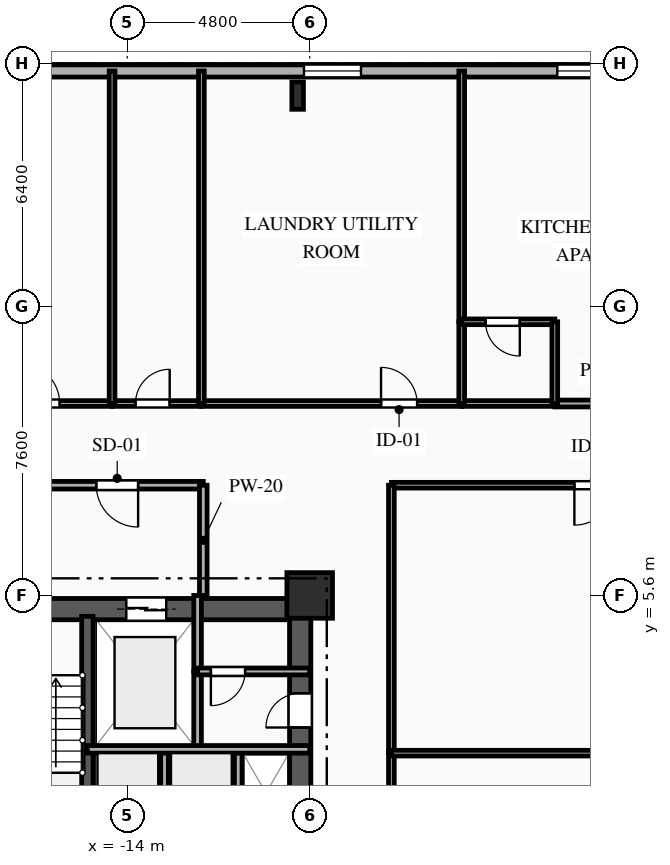
"""IFC4 building model, lengths in metres.
Left out: names, types, materials, properties, quantities, classifications, styles, units other than length and angle.
Written with IfcOpenShell. Run it as: python <this file> out.ifc"""

import sys

from ifc_helpers import new_model, si_unit, direction, frame, frame_2d, origin, origin_2d, place, context, subcontext, project, spatial, rectangle, i_section, extrude, element, fill, save


model = new_model("IFC4")
c1 = context("Model", 3, precision=1e-05, world=origin(), true_north=direction((0.0, 1.0)))
c2 = subcontext(c1, "Body", "Model", "MODEL_VIEW")
j1 = project(units=[si_unit("LENGTHUNIT", "METRE"), si_unit("PLANEANGLEUNIT", "RADIAN")], contexts=[c1])
p1 = place(None, origin())
s1 = spatial("IfcSite", under=j1, at=p1, CompositionType="ELEMENT")
p2 = place(p1, origin())
s2 = spatial("IfcBuilding", under=s1, at=p2, CompositionType="ELEMENT")
p3 = place(p2, frame((0.0, 0.0, 40.4)))
s3 = spatial("IfcBuildingStorey", under=s2, at=p3, CompositionType="ELEMENT", Elevation=40.4)
p4 = place(p3, frame((-9.2, 5.6, 0.0), z_axis=(0.0, 0.0, 1.0), x_axis=(1.0, 0.0, 0.0)))
e1 = element("IfcColumn", 1, at=p4, inside=s3, PredefinedType="COLUMN", context=c2, shape_type="SweptSolid", body=[
    extrude(rectangle(XDim=1.2, YDim=1.2, at=origin_2d()), origin(), (0.0, 0.0, 1.0), 3.35),
])
p5 = place(p3, frame((-9.517, 18.75, 0.0), z_axis=(0.0, 0.0, 1.0), x_axis=(1.0, 0.0, 0.0)))
e2 = element("IfcColumn", 2, at=p5, inside=s3, PredefinedType="COLUMN", context=c2, shape_type="SweptSolid", body=[
    extrude(i_section(OverallWidth=0.304, OverallDepth=0.716, WebThickness=0.021, FlangeThickness=0.04, FilletRadius=0.027, at=origin_2d()), origin(), (0.0, 0.0, 1.0), 3.35),
])
p6 = place(p3, frame((-29.2, 19.4, 0.0), z_axis=(0.0, 0.0, 1.0), x_axis=(1.0, 0.0, 0.0)))
e3 = element("IfcWall", 3, at=p6, inside=s3, PredefinedType="SOLIDWALL", context=c2, shape_type="SweptSolid", body=[
    extrude(rectangle(XDim=58.4, YDim=0.32, at=frame_2d((29.2, 0.0))), origin(), (0.0, 0.0, 1.0), 3.035),
])
p7 = place(p6, frame((10.596, 0.0, 0.85)))
e4 = element("IfcOpeningElement", 4, at=p7, cuts=e3, PredefinedType="OPENING", context=c2, shape_type="SweptSolid", body=[
    extrude(rectangle(XDim=1.65, YDim=1.85, at=frame_2d((0.825, 0.925))), frame((0.0, 0.17, 0.0), z_axis=(0.0, -1.0, 0.0), x_axis=(1.0, 0.0, 0.0)), (0.0, 0.0, 1.0), 0.34),
])
p8 = place(p6, frame((19.85, 0.0, 0.85)))
e5 = element("IfcOpeningElement", 5, at=p8, cuts=e3, PredefinedType="OPENING", context=c2, shape_type="SweptSolid", body=[
    extrude(rectangle(XDim=1.5, YDim=1.85, at=frame_2d((0.75, 0.925))), frame((0.0, 0.17, 0.0), z_axis=(0.0, -1.0, 0.0), x_axis=(1.0, 0.0, 0.0)), (0.0, 0.0, 1.0), 0.34),
])
p9 = place(p6, frame((26.516, 0.0, 0.85)))
e6 = element("IfcOpeningElement", 6, at=p9, cuts=e3, PredefinedType="OPENING", context=c2, shape_type="SweptSolid", body=[
    extrude(rectangle(XDim=2.2, YDim=1.85, at=frame_2d((1.1, 0.925))), frame((0.0, 0.17, 0.0), z_axis=(0.0, -1.0, 0.0), x_axis=(1.0, 0.0, 0.0)), (0.0, 0.0, 1.0), 0.34),
])
p10 = place(p6, frame((35.716, 0.0, 0.85)))
e7 = element("IfcOpeningElement", 7, at=p10, cuts=e3, PredefinedType="OPENING", context=c2, shape_type="SweptSolid", body=[
    extrude(rectangle(XDim=2.2, YDim=1.85, at=frame_2d((1.1, 0.925))), frame((0.0, 0.17, 0.0), z_axis=(0.0, -1.0, 0.0), x_axis=(1.0, 0.0, 0.0)), (0.0, 0.0, 1.0), 0.34),
])
p11 = place(p6, frame((44.095, 0.0, 0.85)))
e8 = element("IfcOpeningElement", 8, at=p11, cuts=e3, PredefinedType="OPENING", context=c2, shape_type="SweptSolid", body=[
    extrude(rectangle(XDim=1.65, YDim=1.85, at=frame_2d((0.825, 0.925))), frame((0.0, 0.17, 0.0), z_axis=(0.0, -1.0, 0.0), x_axis=(1.0, 0.0, 0.0)), (0.0, 0.0, 1.0), 0.34),
])
p12 = place(p6, frame((48.975, 0.0, 0.85)))
e9 = element("IfcOpeningElement", 9, at=p12, cuts=e3, PredefinedType="OPENING", context=c2, shape_type="SweptSolid", body=[
    extrude(rectangle(XDim=1.65, YDim=1.85, at=frame_2d((0.825, 0.925))), frame((0.0, 0.17, 0.0), z_axis=(0.0, -1.0, 0.0), x_axis=(1.0, 0.0, 0.0)), (0.0, 0.0, 1.0), 0.34),
])
p13 = place(p6, frame((52.82, 0.0, 0.85)))
e10 = element("IfcOpeningElement", 10, at=p13, cuts=e3, PredefinedType="OPENING", context=c2, shape_type="SweptSolid", body=[
    extrude(rectangle(XDim=1.4, YDim=1.85, at=frame_2d((0.7, 0.925))), frame((0.0, 0.17, 0.0), z_axis=(0.0, -1.0, 0.0), x_axis=(1.0, 0.0, 0.0)), (0.0, 0.0, 1.0), 0.34),
])
p14 = place(p6, frame((55.575, 0.0, 0.85)))
e11 = element("IfcOpeningElement", 11, at=p14, cuts=e3, PredefinedType="OPENING", context=c2, shape_type="SweptSolid", body=[
    extrude(rectangle(XDim=1.65, YDim=1.85, at=frame_2d((0.825, 0.925))), frame((0.0, 0.17, 0.0), z_axis=(0.0, -1.0, 0.0), x_axis=(1.0, 0.0, 0.0)), (0.0, 0.0, 1.0), 0.34),
])
p15 = place(p3, frame((-18.8, 5.24, 0.0), z_axis=(0.0, 0.0, 1.0), x_axis=(1.0, 0.0, 0.0)))
e12 = element("IfcWall", 12, at=p15, inside=s3, PredefinedType="SHEAR", context=c2, shape_type="SweptSolid", body=[
    extrude(rectangle(XDim=9.6, YDim=0.56, at=frame_2d((4.8, 0.0))), origin(), (0.0, 0.0, 1.0), 3.035),
])
p16 = place(p15, frame((1.55, 0.0, 0.0)))
e13 = element("IfcOpeningElement", 13, at=p16, cuts=e12, PredefinedType="OPENING", context=c2, shape_type="SweptSolid", body=[
    extrude(rectangle(XDim=1.1, YDim=2.15, at=frame_2d((0.55, 1.075))), frame((0.0, 0.29, 0.0), z_axis=(0.0, -1.0, 0.0), x_axis=(1.0, 0.0, 0.0)), (0.0, 0.0, 1.0), 0.58),
])
p17 = place(p15, frame((4.775, 0.0, 0.0)))
e14 = element("IfcOpeningElement", 14, at=p17, cuts=e12, PredefinedType="OPENING", context=c2, shape_type="SweptSolid", body=[
    extrude(rectangle(XDim=1.05, YDim=2.1, at=frame_2d((0.525, 1.05))), frame((0.0, 0.29, 0.0), z_axis=(0.0, -1.0, 0.0), x_axis=(1.0, 0.0, 0.0)), (0.0, 0.0, 1.0), 0.58),
])
p18 = place(p3, frame((-9.45, -5.05, 0.0), z_axis=(0.0, 0.0, 1.0), x_axis=(0.0, 1.0, 0.0)))
e15 = element("IfcWall", 15, at=p18, inside=s3, PredefinedType="SHEAR", context=c2, shape_type="SweptSolid", body=[
    extrude(rectangle(XDim=10.1, YDim=0.56, at=frame_2d((5.05, 0.0))), origin(), (0.0, 0.0, 1.0), 3.035),
])
p19 = place(p18, frame((7.175, 0.0, 0.0)))
e16 = element("IfcOpeningElement", 16, at=p19, cuts=e15, PredefinedType="OPENING", context=c2, shape_type="SweptSolid", body=[
    extrude(rectangle(XDim=0.9, YDim=2.1, at=frame_2d((0.45, 1.05))), frame((0.0, 0.29, 0.0), z_axis=(0.0, -1.0, 0.0), x_axis=(1.0, 0.0, 0.0)), (0.0, 0.0, 1.0), 0.58),
])
p20 = place(p18, frame((2.4, 0.0, 0.0)))
e17 = element("IfcOpeningElement", 17, at=p20, cuts=e15, PredefinedType="OPENING", context=c2, shape_type="SweptSolid", body=[
    extrude(rectangle(XDim=1.2, YDim=2.15, at=frame_2d((0.6, 1.075))), frame((0.0, 0.29, 0.0), z_axis=(0.0, -1.0, 0.0), x_axis=(1.0, 0.0, 0.0)), (0.0, 0.0, 1.0), 0.58),
])
p21 = place(p3, frame((-15.05, -5.05, 0.0), z_axis=(0.0, 0.0, 1.0), x_axis=(0.0, 1.0, 0.0)))
e18 = element("IfcWall", 18, at=p21, inside=s3, PredefinedType="SHEAR", context=c2, shape_type="SweptSolid", body=[
    extrude(rectangle(XDim=10.1, YDim=0.3, at=frame_2d((5.05, 0.0))), origin(), (0.0, 0.0, 1.0), 3.035),
])
p22 = place(p3, frame((-12.15, 1.55, 0.0), z_axis=(0.0, 0.0, 1.0), x_axis=(0.0, 1.0, 0.0)))
e19 = element("IfcWall", 19, at=p22, inside=s3, PredefinedType="PARTITIONING", context=c2, shape_type="SweptSolid", body=[
    extrude(rectangle(XDim=2.05, YDim=0.2, at=frame_2d((1.025, 0.0))), origin(), (0.0, 0.0, 1.0), 3.035),
])
p23 = place(p3, frame((-12.15, 3.6, 0.0), z_axis=(0.0, 0.0, 1.0), x_axis=(0.0, 1.0, 0.0)))
e20 = element("IfcWall", 20, at=p23, inside=s3, PredefinedType="PARTITIONING", context=c2, shape_type="SweptSolid", body=[
    extrude(rectangle(XDim=2.0, YDim=0.2, at=frame_2d((1.0, 0.0))), origin(), (0.0, 0.0, 1.0), 3.035),
])
p24 = place(p3, frame((-12.0, 8.5, 0.0), z_axis=(0.0, 0.0, 1.0), x_axis=(-1.0, 0.0, 0.0)))
e21 = element("IfcWall", 21, at=p24, inside=s3, PredefinedType="PARTITIONING", context=c2, shape_type="SweptSolid", body=[
    extrude(rectangle(XDim=6.8, YDim=0.2, at=frame_2d((3.4, 0.0))), origin(), (0.0, 0.0, 1.0), 3.035),
])
p25 = place(p24, frame((1.715, 0.0, 0.0)))
e22 = element("IfcOpeningElement", 22, at=p25, cuts=e21, PredefinedType="OPENING", context=c2, shape_type="SweptSolid", body=[
    extrude(rectangle(XDim=1.1, YDim=2.15, at=frame_2d((0.55, 1.075))), frame((0.0, 0.11, 0.0), z_axis=(0.0, -1.0, 0.0), x_axis=(1.0, 0.0, 0.0)), (0.0, 0.0, 1.0), 0.22),
])
p26 = place(p3, frame((-12.0, 5.6, 0.0), z_axis=(0.0, 0.0, 1.0), x_axis=(0.0, 1.0, 0.0)))
e23 = element("IfcWall", 23, at=p26, inside=s3, PredefinedType="PARTITIONING", context=c2, shape_type="SweptSolid", body=[
    extrude(rectangle(XDim=2.9, YDim=0.2, at=frame_2d((1.45, 0.0))), origin(), (0.0, 0.0, 1.0), 3.035),
])
p27 = place(p3, frame((-9.2, 3.6, 0.0), z_axis=(0.0, 0.0, 1.0), x_axis=(-1.0, 0.0, 0.0)))
e24 = element("IfcWall", 24, at=p27, inside=s3, PredefinedType="PARTITIONING", context=c2, shape_type="SweptSolid", body=[
    extrude(rectangle(XDim=2.95, YDim=0.18, at=frame_2d((1.475, 0.0))), origin(), (0.0, 0.0, 1.0), 3.035),
])
p28 = place(p27, frame((1.7, 0.0, 0.0)))
e25 = element("IfcOpeningElement", 25, at=p28, cuts=e24, PredefinedType="OPENING", context=c2, shape_type="SweptSolid", body=[
    extrude(rectangle(XDim=0.9, YDim=2.1, at=frame_2d((0.45, 1.05))), frame((0.0, 0.1, 0.0), z_axis=(0.0, -1.0, 0.0), x_axis=(1.0, 0.0, 0.0)), (0.0, 0.0, 1.0), 0.2),
])
for number, where, z_axis, x_axis in (
    (26, (-13.02, -0.75, 0.0), (0.0, 0.0, 1.0), (0.0, 1.0, 0.0)),
    (27, (-11.08, -0.75, 0.0), (0.0, 0.0, 1.0), (0.0, 1.0, 0.0)),
):
    element("IfcWall", number, at=place(p3, frame(where, z_axis=z_axis, x_axis=x_axis)), inside=s3, PredefinedType="PARTITIONING", context=c2, shape_type="SweptSolid", body=[
        extrude(rectangle(XDim=2.3, YDim=0.2, at=frame_2d((1.15, 0.0))), origin(), (0.0, 0.0, 1.0), 3.035),
    ])
p29 = place(p3, frame((-23.0, 10.65, 0.0), z_axis=(0.0, 0.0, 1.0), x_axis=(1.0, 0.0, 0.0)))
e28 = element("IfcWall", 28, at=p29, inside=s3, PredefinedType="PARTITIONING", context=c2, shape_type="SweptSolid", body=[
    extrude(rectangle(XDim=8.6, YDim=0.15, at=frame_2d((4.3, 0.0))), origin(), (0.0, 0.0, 1.0), 3.035),
])
p30 = place(p29, frame((6.171, 0.0, 0.0)))
e29 = element("IfcOpeningElement", 29, at=p30, cuts=e28, PredefinedType="OPENING", context=c2, shape_type="SweptSolid", body=[
    extrude(rectangle(XDim=1.05, YDim=2.15, at=frame_2d((0.525, 1.075))), frame((0.0, 0.085, 0.0), z_axis=(0.0, -1.0, 0.0), x_axis=(1.0, 0.0, 0.0)), (0.0, 0.0, 1.0), 0.17),
])
p31 = place(p3, frame((-14.4, 10.65, 0.0), z_axis=(0.0, 0.0, 1.0), x_axis=(1.0, 0.0, 0.0)))
e30 = element("IfcWall", 30, at=p31, inside=s3, PredefinedType="PLUMBINGWALL", context=c2, shape_type="SweptSolid", body=[
    extrude(rectangle(XDim=2.35, YDim=0.15, at=frame_2d((1.175, 0.0))), origin(), (0.0, 0.0, 1.0), 3.035),
])
p32 = place(p31, frame((0.616, 0.0, 0.0)))
e31 = element("IfcOpeningElement", 31, at=p32, cuts=e30, PredefinedType="OPENING", context=c2, shape_type="SweptSolid", body=[
    extrude(rectangle(XDim=0.9, YDim=2.1, at=frame_2d((0.45, 1.05))), frame((0.0, 0.085, 0.0), z_axis=(0.0, -1.0, 0.0), x_axis=(1.0, 0.0, 0.0)), (0.0, 0.0, 1.0), 0.17),
])
p33 = place(p3, frame((-12.05, 10.65, 0.0), z_axis=(0.0, 0.0, 1.0), x_axis=(1.0, 0.0, 0.0)))
e32 = element("IfcWall", 32, at=p33, inside=s3, PredefinedType="PARTITIONING", context=c2, shape_type="SweptSolid", body=[
    extrude(rectangle(XDim=6.85, YDim=0.15, at=frame_2d((3.425, 0.0))), origin(), (0.0, 0.0, 1.0), 3.035),
])
p34 = place(p33, frame((4.728, 0.0, 0.0)))
e33 = element("IfcOpeningElement", 33, at=p34, cuts=e32, PredefinedType="OPENING", context=c2, shape_type="SweptSolid", body=[
    extrude(rectangle(XDim=0.95, YDim=2.1, at=frame_2d((0.475, 1.05))), frame((0.0, 0.085, 0.0), z_axis=(0.0, -1.0, 0.0), x_axis=(1.0, 0.0, 0.0)), (0.0, 0.0, 1.0), 0.17),
])
p35 = place(p3, frame((-2.75, 10.65, 0.0), z_axis=(0.0, 0.0, 1.0), x_axis=(1.0, 0.0, 0.0)))
e34 = element("IfcWall", 34, at=p35, inside=s3, PredefinedType="PARTITIONING", context=c2, shape_type="SweptSolid", body=[
    extrude(rectangle(XDim=2.75, YDim=0.18, at=frame_2d((1.375, 0.0))), origin(), (0.0, 0.0, 1.0), 3.035),
])
p36 = place(p3, frame((-5.2, 10.65, 0.0), z_axis=(0.0, 0.0, 1.0), x_axis=(1.0, 0.0, 0.0)))
e35 = element("IfcWall", 35, at=p36, inside=s3, PredefinedType="PLUMBINGWALL", context=c2, shape_type="SweptSolid", body=[
    extrude(rectangle(XDim=2.45, YDim=0.15, at=frame_2d((1.225, 0.0))), origin(), (0.0, 0.0, 1.0), 3.035),
])
p37 = place(p3, frame((0.0, 8.5, 0.0), z_axis=(0.0, 0.0, 1.0), x_axis=(-1.0, 0.0, 0.0)))
e36 = element("IfcWall", 36, at=p37, inside=s3, PredefinedType="PARTITIONING", context=c2, shape_type="SweptSolid", body=[
    extrude(rectangle(XDim=7.05, YDim=0.15, at=frame_2d((3.525, 0.0))), origin(), (0.0, 0.0, 1.0), 3.035),
])
p38 = place(p37, frame((1.185, 0.0, 0.0)))
e37 = element("IfcOpeningElement", 37, at=p38, cuts=e36, PredefinedType="OPENING", context=c2, shape_type="SweptSolid", body=[
    extrude(rectangle(XDim=1.05, YDim=2.15, at=frame_2d((0.525, 1.075))), frame((0.0, 0.085, 0.0), z_axis=(0.0, -1.0, 0.0), x_axis=(1.0, 0.0, 0.0)), (0.0, 0.0, 1.0), 0.17),
])
for number, where, z_axis, x_axis in (
    (38, (-7.05, 1.45, 0.0), (0.0, 0.0, 1.0), (0.0, -1.0, 0.0)),
    (39, (-7.05, 8.5, 0.0), (0.0, 0.0, 1.0), (0.0, -1.0, 0.0)),
):
    element("IfcWall", number, at=place(p3, frame(where, z_axis=z_axis, x_axis=x_axis)), inside=s3, PredefinedType="PARTITIONING", context=c2, shape_type="SweptSolid", body=[
        extrude(rectangle(XDim=7.05, YDim=0.15, at=frame_2d((3.525, 0.0))), origin(), (0.0, 0.0, 1.0), 3.035),
    ])
for number, where, z_axis, x_axis in (
    (40, (-14.4, 19.4, 0.0), (0.0, 0.0, 1.0), (0.0, -1.0, 0.0)),
    (41, (-12.05, 19.4, 0.0), (0.0, 0.0, 1.0), (0.0, -1.0, 0.0)),
):
    element("IfcWall", number, at=place(p3, frame(where, z_axis=z_axis, x_axis=x_axis)), inside=s3, PredefinedType="PLUMBINGWALL", context=c2, shape_type="SweptSolid", body=[
        extrude(rectangle(XDim=8.75, YDim=0.15, at=frame_2d((4.375, 0.0))), origin(), (0.0, 0.0, 1.0), 3.035),
    ])
p39 = place(p3, frame((-5.2, 19.4, 0.0), z_axis=(0.0, 0.0, 1.0), x_axis=(0.0, -1.0, 0.0)))
e42 = element("IfcWall", 42, at=p39, inside=s3, PredefinedType="PARTITIONING", context=c2, shape_type="SweptSolid", body=[
    extrude(rectangle(XDim=6.6, YDim=0.15, at=frame_2d((3.3, 0.0))), origin(), (0.0, 0.0, 1.0), 3.035),
])
p40 = place(p3, frame((-5.2, 12.8, 0.0), z_axis=(0.0, 0.0, 1.0), x_axis=(0.0, -1.0, 0.0)))
e43 = element("IfcWall", 43, at=p40, inside=s3, PredefinedType="PLUMBINGWALL", context=c2, shape_type="SweptSolid", body=[
    extrude(rectangle(XDim=2.15, YDim=0.15, at=frame_2d((1.075, 0.0))), origin(), (0.0, 0.0, 1.0), 3.035),
])
p41 = place(p3, frame((-2.75, 12.8, 0.0), z_axis=(0.0, 0.0, 1.0), x_axis=(-1.0, 0.0, 0.0)))
e44 = element("IfcWall", 44, at=p41, inside=s3, PredefinedType="PLUMBINGWALL", context=c2, shape_type="SweptSolid", body=[
    extrude(rectangle(XDim=2.45, YDim=0.15, at=frame_2d((1.225, 0.0))), origin(), (0.0, 0.0, 1.0), 3.035),
])
p42 = place(p41, frame((0.921, 0.0, 0.0)))
e45 = element("IfcOpeningElement", 45, at=p42, cuts=e44, PredefinedType="OPENING", context=c2, shape_type="SweptSolid", body=[
    extrude(rectangle(XDim=0.9, YDim=2.1, at=frame_2d((0.45, 1.05))), frame((0.0, 0.085, 0.0), z_axis=(0.0, -1.0, 0.0), x_axis=(1.0, 0.0, 0.0)), (0.0, 0.0, 1.0), 0.17),
])
p43 = place(p3, frame((-2.75, 10.65, 0.0), z_axis=(0.0, 0.0, 1.0), x_axis=(0.0, 1.0, 0.0)))
e46 = element("IfcWall", 46, at=p43, inside=s3, PredefinedType="PLUMBINGWALL", context=c2, shape_type="SweptSolid", body=[
    extrude(rectangle(XDim=2.15, YDim=0.15, at=frame_2d((1.075, 0.0))), origin(), (0.0, 0.0, 1.0), 3.035),
])
p44 = place(p3, frame((-7.05, 1.45, 0.0), z_axis=(0.0, 0.0, 1.0), x_axis=(1.0, 0.0, 0.0)))
e47 = element("IfcWall", 47, at=p44, inside=s3, PredefinedType="PARTITIONING", context=c2, shape_type="SweptSolid", body=[
    extrude(rectangle(XDim=14.1, YDim=0.15, at=frame_2d((7.05, 0.0))), origin(), (0.0, 0.0, 1.0), 3.035),
])
p45 = place(p3, frame((-15.05, 1.55, 0.0), z_axis=(0.0, 0.0, 1.0), x_axis=(1.0, 0.0, 0.0)))
e48 = element("IfcWall", 48, at=p45, inside=s3, PredefinedType="PARTITIONING", context=c2, shape_type="SweptSolid", body=[
    extrude(rectangle(XDim=5.85, YDim=0.2, at=frame_2d((2.925, 0.0))), origin(), (0.0, 0.0, 1.0), 3.035),
])
p46 = place(p8, origin())
e49 = element("IfcWindow", 49, at=p46, inside=s3, PartitioningType="SINGLE_PANEL", PredefinedType="WINDOW", context=c2, shape_type="SweptSolid", body=[
    extrude(rectangle(XDim=1.5, YDim=1.85, at=frame_2d((0.75, 0.925))), frame((0.0, 0.03, 0.0), z_axis=(0.0, -1.0, 0.0), x_axis=(1.0, 0.0, 0.0)), (0.0, 0.0, 1.0), 0.06),
])
fill(e5, e49)
p47 = place(p9, origin())
e50 = element("IfcWindow", 50, at=p47, inside=s3, PartitioningType="SINGLE_PANEL", PredefinedType="WINDOW", context=c2, shape_type="SweptSolid", body=[
    extrude(rectangle(XDim=2.2, YDim=1.85, at=frame_2d((1.1, 0.925))), frame((0.0, 0.03, 0.0), z_axis=(0.0, -1.0, 0.0), x_axis=(1.0, 0.0, 0.0)), (0.0, 0.0, 1.0), 0.06),
])
fill(e6, e50)
p48 = place(p17, origin())
e51 = element("IfcDoor", 51, at=p48, inside=s3, OperationType="DOUBLE_DOOR_SLIDING", PredefinedType="DOOR", context=c2, shape_type="SweptSolid", body=[
    extrude(rectangle(XDim=1.05, YDim=2.1, at=frame_2d((0.525, 1.05))), frame((0.0, 0.025, 0.0), z_axis=(0.0, -1.0, 0.0), x_axis=(1.0, 0.0, 0.0)), (0.0, 0.0, 1.0), 0.05),
])
fill(e14, e51)
p49 = place(p25, origin())
e52 = element("IfcDoor", 52, at=p49, inside=s3, OperationType="SINGLE_SWING_LEFT", PredefinedType="DOOR", context=c2, shape_type="SweptSolid", body=[
    extrude(rectangle(XDim=1.1, YDim=2.15, at=frame_2d((0.55, 1.075))), frame((0.0, 0.025, 0.0), z_axis=(0.0, -1.0, 0.0), x_axis=(1.0, 0.0, 0.0)), (0.0, 0.0, 1.0), 0.05),
])
fill(e22, e52)
p50 = place(p28, origin())
e53 = element("IfcDoor", 53, at=p50, inside=s3, OperationType="SINGLE_SWING_RIGHT", PredefinedType="DOOR", context=c2, shape_type="SweptSolid", body=[
    extrude(rectangle(XDim=0.9, YDim=2.1, at=frame_2d((0.45, 1.05))), frame((0.0, 0.025, 0.0), z_axis=(0.0, -1.0, 0.0), x_axis=(1.0, 0.0, 0.0)), (0.0, 0.0, 1.0), 0.05),
])
fill(e25, e53)
p51 = place(p19, origin())
e54 = element("IfcDoor", 54, at=p51, inside=s3, OperationType="SINGLE_SWING_LEFT", PredefinedType="DOOR", context=c2, shape_type="SweptSolid", body=[
    extrude(rectangle(XDim=0.9, YDim=2.1, at=frame_2d((0.45, 1.05))), frame((0.0, 0.025, 0.0), z_axis=(0.0, -1.0, 0.0), x_axis=(1.0, 0.0, 0.0)), (0.0, 0.0, 1.0), 0.05),
])
fill(e16, e54)
p52 = place(p30, origin())
e55 = element("IfcDoor", 55, at=p52, inside=s3, OperationType="SINGLE_SWING_LEFT", PredefinedType="DOOR", context=c2, shape_type="SweptSolid", body=[
    extrude(rectangle(XDim=1.05, YDim=2.15, at=frame_2d((0.525, 1.075))), frame((0.0, 0.025, 0.0), z_axis=(0.0, -1.0, 0.0), x_axis=(1.0, 0.0, 0.0)), (0.0, 0.0, 1.0), 0.05),
])
fill(e29, e55)
p53 = place(p32, origin())
e56 = element("IfcDoor", 56, at=p53, inside=s3, OperationType="SINGLE_SWING_RIGHT", PredefinedType="DOOR", context=c2, shape_type="SweptSolid", body=[
    extrude(rectangle(XDim=0.9, YDim=2.1, at=frame_2d((0.45, 1.05))), frame((0.0, 0.025, 0.0), z_axis=(0.0, -1.0, 0.0), x_axis=(1.0, 0.0, 0.0)), (0.0, 0.0, 1.0), 0.05),
])
fill(e31, e56)
p54 = place(p34, origin())
e57 = element("IfcDoor", 57, at=p54, inside=s3, OperationType="SINGLE_SWING_LEFT", PredefinedType="DOOR", context=c2, shape_type="SweptSolid", body=[
    extrude(rectangle(XDim=0.95, YDim=2.1, at=frame_2d((0.475, 1.05))), frame((0.0, 0.025, 0.0), z_axis=(0.0, -1.0, 0.0), x_axis=(1.0, 0.0, 0.0)), (0.0, 0.0, 1.0), 0.05),
])
fill(e33, e57)
p55 = place(p38, origin())
e58 = element("IfcDoor", 58, at=p55, inside=s3, OperationType="SINGLE_SWING_RIGHT", PredefinedType="DOOR", context=c2, shape_type="SweptSolid", body=[
    extrude(rectangle(XDim=1.05, YDim=2.15, at=frame_2d((0.525, 1.075))), frame((0.0, 0.025, 0.0), z_axis=(0.0, -1.0, 0.0), x_axis=(1.0, 0.0, 0.0)), (0.0, 0.0, 1.0), 0.05),
])
fill(e37, e58)
p56 = place(p42, origin())
e59 = element("IfcDoor", 59, at=p56, inside=s3, OperationType="SINGLE_SWING_LEFT", PredefinedType="DOOR", context=c2, shape_type="SweptSolid", body=[
    extrude(rectangle(XDim=0.9, YDim=2.1, at=frame_2d((0.45, 1.05))), frame((0.0, 0.025, 0.0), z_axis=(0.0, -1.0, 0.0), x_axis=(1.0, 0.0, 0.0)), (0.0, 0.0, 1.0), 0.05),
])
fill(e45, e59)
save(model, sys.argv[1])
